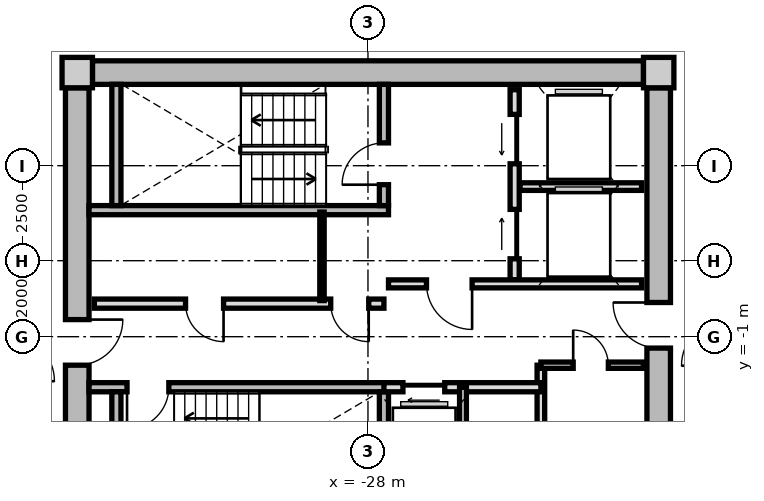
"""IFC4 building model, lengths in metres.
Left out: names, types, materials, properties, quantities, classifications, styles, units other than length and angle.
Written with IfcOpenShell. Run it as: python <this file> out.ifc"""

import sys

from ifc_helpers import new_model, si_unit, direction, frame, frame_2d, origin, origin_2d, place, context, subcontext, project, spatial, rectangle, extrude, source, transform, mapped, element, fill, save


model = new_model("IFC4")
c1 = context("Model", 3, precision=1e-05, world=origin(), true_north=direction((0.0, 1.0)))
c2 = subcontext(c1, "Body", "Model", "MODEL_VIEW")
j1 = project(units=[si_unit("LENGTHUNIT", "METRE"), si_unit("PLANEANGLEUNIT", "RADIAN")], contexts=[c1])
p1 = place(None, origin())
s1 = spatial("IfcSite", under=j1, at=p1, CompositionType="ELEMENT")
p2 = place(p1, origin())
s2 = spatial("IfcBuilding", under=s1, at=p2, CompositionType="ELEMENT")
p3 = place(p2, frame((0.0, 0.0, 149.55)))
s3 = spatial("IfcBuildingStorey", under=s2, at=p3, CompositionType="ELEMENT", Elevation=149.55)
m1 = source(origin(), c2, "Body", "SweptSolid", [
    extrude(rectangle(XDim=0.8, YDim=0.8, at=origin_2d()), origin(), (0.0, 0.0, 1.0), 3.05),
])
for number, where, z_axis, x_axis in (
    (1, (-20.35, 5.95, 0.0), (0.0, 0.0, 1.0), (1.0, 0.0, 0.0)),
    (2, (-35.65, 5.95, 0.0), (0.0, 0.0, 1.0), (1.0, 0.0, 0.0)),
):
    element("IfcColumn", number, at=place(p3, frame(where, z_axis=z_axis, x_axis=x_axis)), inside=s3, PredefinedType="COLUMN", context=c2, shape_type="MappedRepresentation", body=[
        mapped(m1, transform((0.0, 0.0, 0.0), x_axis=(1.0, 0.0, 0.0), y_axis=(0.0, 1.0, 0.0), z_axis=(0.0, 0.0, 1.0), scale=1.0)),
    ])
m2 = source(origin(), c2, "Body", "SweptSolid", [
    extrude(rectangle(XDim=14.5, YDim=0.62, at=frame_2d((7.25, 0.0))), origin(), (0.0, 0.0, 1.0), 2.81),
])
p4 = place(p3, frame((-35.25, 5.95, 0.0), z_axis=(0.0, 0.0, 1.0), x_axis=(1.0, 0.0, 0.0)))
e3 = element("IfcWall", 3, at=p4, inside=s3, PredefinedType="SHEAR", context=c2, shape_type="MappedRepresentation", body=[
    mapped(m2, transform((0.0, 0.0, 0.0), x_axis=(1.0, 0.0, 0.0), y_axis=(0.0, 1.0, 0.0), z_axis=(0.0, 0.0, 1.0), scale=1.0)),
])
m3 = source(origin(), c2, "Body", "SweptSolid", [
    extrude(rectangle(XDim=11.1, YDim=0.62, at=frame_2d((5.55, 0.0))), origin(), (0.0, 0.0, 1.0), 2.81),
])
p5 = place(p3, frame((-35.65, -5.55, 0.0), z_axis=(0.0, 0.0, 1.0), x_axis=(0.0, 1.0, 0.0)))
e4 = element("IfcWall", 4, at=p5, inside=s3, PredefinedType="SHEAR", context=c2, shape_type="MappedRepresentation", body=[
    mapped(m3, transform((0.0, 0.0, 0.0), x_axis=(1.0, 0.0, 0.0), y_axis=(0.0, 1.0, 0.0), z_axis=(0.0, 0.0, 1.0), scale=1.0)),
])
p6 = place(p5, frame((3.8, 0.0, 0.0)))
e5 = element("IfcOpeningElement", 5, at=p6, cuts=e4, PredefinedType="OPENING", context=c2, shape_type="SweptSolid", body=[
    extrude(rectangle(XDim=1.2, YDim=2.15, at=frame_2d((0.6, 1.075))), frame((0.0, 0.32, 0.0), z_axis=(0.0, -1.0, 0.0), x_axis=(1.0, 0.0, 0.0)), (0.0, 0.0, 1.0), 0.64),
])
p7 = place(p3, frame((-20.35, 5.55, 0.0), z_axis=(0.0, 0.0, 1.0), x_axis=(0.0, -1.0, 0.0)))
e6 = element("IfcWall", 6, at=p7, inside=s3, PredefinedType="SHEAR", context=c2, shape_type="MappedRepresentation", body=[
    mapped(m3, transform((0.0, 0.0, 0.0), x_axis=(1.0, 0.0, 0.0), y_axis=(0.0, 1.0, 0.0), z_axis=(0.0, 0.0, 1.0), scale=1.0)),
])
p8 = place(p7, frame((5.65, 0.0, 0.0)))
e7 = element("IfcOpeningElement", 7, at=p8, cuts=e6, PredefinedType="OPENING", context=c2, shape_type="SweptSolid", body=[
    extrude(rectangle(XDim=1.2, YDim=2.15, at=frame_2d((0.6, 1.075))), frame((0.0, 0.32, 0.0), z_axis=(0.0, -1.0, 0.0), x_axis=(1.0, 0.0, 0.0)), (0.0, 0.0, 1.0), 0.64),
])
p9 = place(p7, frame((9.3, 0.0, 0.0)))
e8 = element("IfcOpeningElement", 8, at=p9, cuts=e6, PredefinedType="OPENING", context=c2, shape_type="SweptSolid", body=[
    extrude(rectangle(XDim=1.0, YDim=2.1, at=frame_2d((0.5, 1.05))), frame((0.0, 0.32, 0.0), z_axis=(0.0, -1.0, 0.0), x_axis=(1.0, 0.0, 0.0)), (0.0, 0.0, 1.0), 0.64),
])
m4 = source(origin(), c2, "Body", "SweptSolid", [
    extrude(rectangle(XDim=7.88, YDim=0.24, at=frame_2d((3.94, 0.0))), origin(), (0.0, 0.0, 1.0), 2.81),
])
p10 = place(p3, frame((-35.34, 2.33, 0.0), z_axis=(0.0, 0.0, 1.0), x_axis=(1.0, 0.0, 0.0)))
e9 = element("IfcWall", 9, at=p10, inside=s3, PredefinedType="PARTITIONING", context=c2, shape_type="MappedRepresentation", body=[
    mapped(m4, transform((0.0, 0.0, 0.0), x_axis=(1.0, 0.0, 0.0), y_axis=(0.0, 1.0, 0.0), z_axis=(0.0, 0.0, 1.0), scale=1.0)),
])
m5 = source(origin(), c2, "Body", "SweptSolid", [
    extrude(rectangle(XDim=3.19, YDim=0.24, at=frame_2d((1.595, 0.0))), origin(), (0.0, 0.0, 1.0), 2.81),
])
p11 = place(p3, frame((-34.62, 2.45, 0.0), z_axis=(0.0, 0.0, 1.0), x_axis=(0.0, 1.0, 0.0)))
e10 = element("IfcWall", 10, at=p11, inside=s3, PredefinedType="PARTITIONING", context=c2, shape_type="MappedRepresentation", body=[
    mapped(m5, transform((0.0, 0.0, 0.0), x_axis=(1.0, 0.0, 0.0), y_axis=(0.0, 1.0, 0.0), z_axis=(0.0, 0.0, 1.0), scale=1.0)),
])
p12 = place(p3, frame((-27.58, 2.45, 0.0), z_axis=(0.0, 0.0, 1.0), x_axis=(0.0, 1.0, 0.0)))
e11 = element("IfcWall", 11, at=p12, inside=s3, PredefinedType="PARTITIONING", context=c2, shape_type="MappedRepresentation", body=[
    mapped(m5, transform((0.0, 0.0, 0.0), x_axis=(1.0, 0.0, 0.0), y_axis=(0.0, 1.0, 0.0), z_axis=(0.0, 0.0, 1.0), scale=1.0)),
])
p13 = place(p12, frame((0.55, 0.0, 0.0)))
e12 = element("IfcOpeningElement", 12, at=p13, cuts=e11, PredefinedType="OPENING", context=c2, shape_type="SweptSolid", body=[
    extrude(rectangle(XDim=1.1, YDim=2.15, at=frame_2d((0.55, 1.075))), frame((0.0, 0.13, 0.0), z_axis=(0.0, -1.0, 0.0), x_axis=(1.0, 0.0, 0.0)), (0.0, 0.0, 1.0), 0.26),
])
p14 = place(p3, frame((-35.34, -2.33, 0.0), z_axis=(0.0, 0.0, 1.0), x_axis=(1.0, 0.0, 0.0)))
e13 = element("IfcWall", 13, at=p14, inside=s3, PredefinedType="PARTITIONING", context=c2, shape_type="MappedRepresentation", body=[
    mapped(m4, transform((0.0, 0.0, 0.0), x_axis=(1.0, 0.0, 0.0), y_axis=(0.0, 1.0, 0.0), z_axis=(0.0, 0.0, 1.0), scale=1.0)),
])
p15 = place(p14, frame((1.0, 0.0, 0.0)))
e14 = element("IfcOpeningElement", 14, at=p15, cuts=e13, PredefinedType="OPENING", context=c2, shape_type="SweptSolid", body=[
    extrude(rectangle(XDim=1.1, YDim=2.15, at=frame_2d((0.55, 1.075))), frame((0.0, 0.13, 0.0), z_axis=(0.0, -1.0, 0.0), x_axis=(1.0, 0.0, 0.0)), (0.0, 0.0, 1.0), 0.26),
])
for number, where, z_axis, x_axis in (
    (15, (-34.62, -5.64, 0.0), (0.0, 0.0, 1.0), (0.0, 1.0, 0.0)),
    (16, (-27.58, -5.64, 0.0), (0.0, 0.0, 1.0), (0.0, 1.0, 0.0)),
):
    element("IfcWall", number, at=place(p3, frame(where, z_axis=z_axis, x_axis=x_axis)), inside=s3, PredefinedType="PARTITIONING", context=c2, shape_type="MappedRepresentation", body=[
        mapped(m5, transform((0.0, 0.0, 0.0), x_axis=(1.0, 0.0, 0.0), y_axis=(0.0, 1.0, 0.0), z_axis=(0.0, 0.0, 1.0), scale=1.0)),
    ])
m6 = source(origin(), c2, "Body", "SweptSolid", [
    extrude(rectangle(XDim=5.0, YDim=0.24, at=frame_2d((2.5, 0.0))), origin(), (0.0, 0.0, 1.0), 2.795),
])
p16 = place(p3, frame((-24.14, 0.5, 0.0), z_axis=(0.0, 0.0, 1.0), x_axis=(0.0, 1.0, 0.0)))
e17 = element("IfcWall", 17, at=p16, inside=s3, PredefinedType="PARTITIONING", context=c2, shape_type="MappedRepresentation", body=[
    mapped(m6, transform((0.0, 0.0, 0.0), x_axis=(1.0, 0.0, 0.0), y_axis=(0.0, 1.0, 0.0), z_axis=(0.0, 0.0, 1.0), scale=1.0)),
])
p17 = place(p16, frame((3.05, 0.0, 0.0)))
e18 = element("IfcOpeningElement", 18, at=p17, cuts=e17, PredefinedType="OPENING", context=c2, shape_type="SweptSolid", body=[
    extrude(rectangle(XDim=1.3, YDim=2.2, at=frame_2d((0.65, 1.1))), frame((0.0, 0.13, 0.0), z_axis=(0.0, -1.0, 0.0), x_axis=(1.0, 0.0, 0.0)), (0.0, 0.0, 1.0), 0.26),
])
p18 = place(p16, frame((0.55, 0.0, 0.0)))
e19 = element("IfcOpeningElement", 19, at=p18, cuts=e17, PredefinedType="OPENING", context=c2, shape_type="SweptSolid", body=[
    extrude(rectangle(XDim=1.3, YDim=2.2, at=frame_2d((0.65, 1.1))), frame((0.0, 0.13, 0.0), z_axis=(0.0, -1.0, 0.0), x_axis=(1.0, 0.0, 0.0)), (0.0, 0.0, 1.0), 0.26),
])
m7 = source(origin(), c2, "Body", "SweptSolid", [
    extrude(rectangle(XDim=3.2, YDim=0.2, at=frame_2d((1.6, 0.0))), origin(), (0.0, 0.0, 1.0), 2.795),
])
p19 = place(p3, frame((-24.0, 2.95, 0.0), z_axis=(0.0, 0.0, 1.0), x_axis=(1.0, 0.0, 0.0)))
e20 = element("IfcWall", 20, at=p19, inside=s3, PredefinedType="PARTITIONING", context=c2, shape_type="MappedRepresentation", body=[
    mapped(m7, transform((0.0, 0.0, 0.0), x_axis=(1.0, 0.0, 0.0), y_axis=(0.0, 1.0, 0.0), z_axis=(0.0, 0.0, 1.0), scale=1.0)),
])
m8 = source(origin(), c2, "Body", "SweptSolid", [
    extrude(rectangle(XDim=6.66, YDim=0.21, at=frame_2d((3.33, 0.0))), origin(), (0.0, 0.0, 1.0), 2.795),
])
p20 = place(p3, frame((-27.46, 0.39, 0.0), z_axis=(0.0, 0.0, 1.0), x_axis=(1.0, 0.0, 0.0)))
e21 = element("IfcWall", 21, at=p20, inside=s3, PredefinedType="PARTITIONING", context=c2, shape_type="MappedRepresentation", body=[
    mapped(m8, transform((0.0, 0.0, 0.0), x_axis=(1.0, 0.0, 0.0), y_axis=(0.0, 1.0, 0.0), z_axis=(0.0, 0.0, 1.0), scale=1.0)),
])
p21 = place(p20, frame((1.0, 0.0, 0.0)))
e22 = element("IfcOpeningElement", 22, at=p21, cuts=e21, PredefinedType="OPENING", context=c2, shape_type="SweptSolid", body=[
    extrude(rectangle(XDim=1.2, YDim=2.15, at=frame_2d((0.6, 1.075))), frame((0.0, 0.115, 0.0), z_axis=(0.0, -1.0, 0.0), x_axis=(1.0, 0.0, 0.0)), (0.0, 0.0, 1.0), 0.23),
])
m9 = source(origin(), c2, "Body", "SweptSolid", [
    extrude(rectangle(XDim=7.62, YDim=0.24, at=frame_2d((3.81, 0.0))), origin(), (0.0, 0.0, 1.0), 2.795),
])
p22 = place(p3, frame((-35.2, -0.13, 0.0), z_axis=(0.0, 0.0, 1.0), x_axis=(1.0, 0.0, 0.0)))
e23 = element("IfcWall", 23, at=p22, inside=s3, PredefinedType="PARTITIONING", context=c2, shape_type="MappedRepresentation", body=[
    mapped(m9, transform((0.0, 0.0, 0.0), x_axis=(1.0, 0.0, 0.0), y_axis=(0.0, 1.0, 0.0), z_axis=(0.0, 0.0, 1.0), scale=1.0)),
])
p23 = place(p22, frame((6.22, 0.0, 0.0)))
e24 = element("IfcOpeningElement", 24, at=p23, cuts=e23, PredefinedType="OPENING", context=c2, shape_type="SweptSolid", body=[
    extrude(rectangle(XDim=1.0, YDim=2.1, at=frame_2d((0.5, 1.05))), frame((0.0, 0.13, 0.0), z_axis=(0.0, -1.0, 0.0), x_axis=(1.0, 0.0, 0.0)), (0.0, 0.0, 1.0), 0.26),
])
p24 = place(p22, frame((2.4, 0.0, 0.0)))
e25 = element("IfcOpeningElement", 25, at=p24, cuts=e23, PredefinedType="OPENING", context=c2, shape_type="SweptSolid", body=[
    extrude(rectangle(XDim=1.0, YDim=2.1, at=frame_2d((0.5, 1.05))), frame((0.0, 0.13, 0.0), z_axis=(0.0, -1.0, 0.0), x_axis=(1.0, 0.0, 0.0)), (0.0, 0.0, 1.0), 0.26),
])
m10 = source(origin(), c2, "Body", "SweptSolid", [
    extrude(rectangle(XDim=2.33, YDim=0.115, at=frame_2d((1.165, 0.0))), origin(), (0.0, 0.0, 1.0), 2.795),
])
p25 = place(p3, frame((-29.21, -0.05, 0.0), z_axis=(0.0, 0.0, 1.0), x_axis=(0.0, 1.0, 0.0)))
e26 = element("IfcWall", 26, at=p25, inside=s3, PredefinedType="PARTITIONING", context=c2, shape_type="MappedRepresentation", body=[
    mapped(m10, transform((0.0, 0.0, 0.0), x_axis=(1.0, 0.0, 0.0), y_axis=(0.0, 1.0, 0.0), z_axis=(0.0, 0.0, 1.0), scale=1.0)),
])
m11 = source(origin(), c2, "Body", "SweptSolid", [
    extrude(rectangle(XDim=3.8, YDim=0.2, at=frame_2d((1.9, 0.0))), origin(), (0.0, 0.0, 1.0), 2.795),
])
p26 = place(p3, frame((-23.45, -5.55, 0.0), z_axis=(0.0, 0.0, 1.0), x_axis=(0.0, 1.0, 0.0)))
e27 = element("IfcWall", 27, at=p26, inside=s3, PredefinedType="PARTITIONING", context=c2, shape_type="MappedRepresentation", body=[
    mapped(m11, transform((0.0, 0.0, 0.0), x_axis=(1.0, 0.0, 0.0), y_axis=(0.0, 1.0, 0.0), z_axis=(0.0, 0.0, 1.0), scale=1.0)),
])
m12 = source(origin(), c2, "Body", "SweptSolid", [
    extrude(rectangle(XDim=4.13, YDim=0.24, at=frame_2d((2.065, 0.0))), origin(), (0.0, 0.0, 1.0), 2.795),
])
p27 = place(p3, frame((-27.58, -2.33, 0.0), z_axis=(0.0, 0.0, 1.0), x_axis=(1.0, 0.0, 0.0)))
e28 = element("IfcWall", 28, at=p27, inside=s3, PredefinedType="PARTITIONING", context=c2, shape_type="MappedRepresentation", body=[
    mapped(m12, transform((0.0, 0.0, 0.0), x_axis=(1.0, 0.0, 0.0), y_axis=(0.0, 1.0, 0.0), z_axis=(0.0, 0.0, 1.0), scale=1.0)),
])
p28 = place(p27, frame((0.5, 0.0, 0.0)))
e29 = element("IfcOpeningElement", 29, at=p28, cuts=e28, PredefinedType="OPENING", context=c2, shape_type="SweptSolid", body=[
    extrude(rectangle(XDim=1.1, YDim=2.2, at=frame_2d((0.55, 1.1))), frame((0.0, 0.13, 0.0), z_axis=(0.0, -1.0, 0.0), x_axis=(1.0, 0.0, 0.0)), (0.0, 0.0, 1.0), 0.26),
])
m13 = source(origin(), c2, "Body", "SweptSolid", [
    extrude(rectangle(XDim=3.22, YDim=0.18, at=frame_2d((1.61, 0.0))), origin(), (0.0, 0.0, 1.0), 2.795),
])
p29 = place(p3, frame((-25.5, -5.55, 0.0), z_axis=(0.0, 0.0, 1.0), x_axis=(0.0, 1.0, 0.0)))
e30 = element("IfcWall", 30, at=p29, inside=s3, PredefinedType="PARTITIONING", context=c2, shape_type="MappedRepresentation", body=[
    mapped(m13, transform((0.0, 0.0, 0.0), x_axis=(1.0, 0.0, 0.0), y_axis=(0.0, 1.0, 0.0), z_axis=(0.0, 0.0, 1.0), scale=1.0)),
])
m14 = source(origin(), c2, "Body", "SweptSolid", [
    extrude(rectangle(XDim=2.7, YDim=0.165, at=frame_2d((1.35, 0.0))), origin(), (0.0, 0.0, 1.0), 2.795),
])
p30 = place(p3, frame((-23.45, -1.75, 0.0), z_axis=(0.0, 0.0, 1.0), x_axis=(1.0, 0.0, 0.0)))
e31 = element("IfcWall", 31, at=p30, inside=s3, PredefinedType="PARTITIONING", context=c2, shape_type="MappedRepresentation", body=[
    mapped(m14, transform((0.0, 0.0, 0.0), x_axis=(1.0, 0.0, 0.0), y_axis=(0.0, 1.0, 0.0), z_axis=(0.0, 0.0, 1.0), scale=1.0)),
])
p31 = place(p30, frame((0.85, 0.0, 0.0)))
e32 = element("IfcOpeningElement", 32, at=p31, cuts=e31, PredefinedType="OPENING", context=c2, shape_type="SweptSolid", body=[
    extrude(rectangle(XDim=0.925, YDim=2.1, at=frame_2d((0.462, 1.05))), frame((0.0, 0.093, 0.0), z_axis=(0.0, -1.0, 0.0), x_axis=(1.0, 0.0, 0.0)), (0.0, 0.0, 1.0), 0.185),
])
m15 = source(origin(), c2, "Body", "SweptSolid", [
    extrude(rectangle(XDim=1.1, YDim=2.15, at=frame_2d((0.55, 1.075))), frame((0.0, 0.025, 0.0), z_axis=(0.0, -1.0, 0.0), x_axis=(1.0, 0.0, 0.0)), (0.0, 0.0, 1.0), 0.05),
])
p32 = place(p13, origin())
e33 = element("IfcDoor", 33, at=p32, inside=s3, OperationType="SINGLE_SWING_LEFT", PredefinedType="DOOR", context=c2, shape_type="MappedRepresentation", body=[
    mapped(m15, transform((0.0, 0.0, 0.0), x_axis=(1.0, 0.0, 0.0), y_axis=(0.0, 1.0, 0.0), z_axis=(0.0, 0.0, 1.0), scale=1.0)),
])
fill(e12, e33)
p33 = place(p15, frame((1.1, 0.0, 0.0), z_axis=(0.0, 0.0, 1.0), x_axis=(-1.0, 0.0, 0.0)))
e34 = element("IfcDoor", 34, at=p33, inside=s3, OperationType="SINGLE_SWING_RIGHT", PredefinedType="DOOR", context=c2, shape_type="MappedRepresentation", body=[
    mapped(m15, transform((0.0, 0.0, 0.0), x_axis=(1.0, 0.0, 0.0), y_axis=(0.0, 1.0, 0.0), z_axis=(0.0, 0.0, 1.0), scale=1.0)),
])
fill(e14, e34)
m16 = source(origin(), c2, "Body", "SweptSolid", [
    extrude(rectangle(XDim=1.3, YDim=2.2, at=frame_2d((0.65, 1.1))), frame((0.0, 0.025, 0.0), z_axis=(0.0, -1.0, 0.0), x_axis=(1.0, 0.0, 0.0)), (0.0, 0.0, 1.0), 0.05),
])
p34 = place(p17, origin())
e35 = element("IfcDoor", 35, at=p34, inside=s3, OperationType="SLIDING_TO_LEFT", PredefinedType="DOOR", context=c2, shape_type="MappedRepresentation", body=[
    mapped(m16, transform((0.0, 0.0, 0.0), x_axis=(1.0, 0.0, 0.0), y_axis=(0.0, 1.0, 0.0), z_axis=(0.0, 0.0, 1.0), scale=1.0)),
])
fill(e18, e35)
p35 = place(p18, origin())
e36 = element("IfcDoor", 36, at=p35, inside=s3, OperationType="SLIDING_TO_RIGHT", PredefinedType="DOOR", context=c2, shape_type="MappedRepresentation", body=[
    mapped(m16, transform((0.0, 0.0, 0.0), x_axis=(1.0, 0.0, 0.0), y_axis=(0.0, 1.0, 0.0), z_axis=(0.0, 0.0, 1.0), scale=1.0)),
])
fill(e19, e36)
m17 = source(origin(), c2, "Body", "SweptSolid", [
    extrude(rectangle(XDim=1.2, YDim=2.15, at=frame_2d((0.6, 1.075))), frame((0.0, 0.025, 0.0), z_axis=(0.0, -1.0, 0.0), x_axis=(1.0, 0.0, 0.0)), (0.0, 0.0, 1.0), 0.05),
])
p36 = place(p21, frame((1.2, 0.0, 0.0), z_axis=(0.0, 0.0, 1.0), x_axis=(-1.0, 0.0, 0.0)))
e37 = element("IfcDoor", 37, at=p36, inside=s3, OperationType="SINGLE_SWING_LEFT", PredefinedType="DOOR", context=c2, shape_type="MappedRepresentation", body=[
    mapped(m17, transform((0.0, 0.0, 0.0), x_axis=(1.0, 0.0, 0.0), y_axis=(0.0, 1.0, 0.0), z_axis=(0.0, 0.0, 1.0), scale=1.0)),
])
fill(e22, e37)
p37 = place(p6, frame((1.2, 0.0, 0.0), z_axis=(0.0, 0.0, 1.0), x_axis=(-1.0, 0.0, 0.0)))
e38 = element("IfcDoor", 38, at=p37, inside=s3, OperationType="SINGLE_SWING_LEFT", PredefinedType="DOOR", context=c2, shape_type="MappedRepresentation", body=[
    mapped(m17, transform((0.0, 0.0, 0.0), x_axis=(1.0, 0.0, 0.0), y_axis=(0.0, 1.0, 0.0), z_axis=(0.0, 0.0, 1.0), scale=1.0)),
])
fill(e5, e38)
p38 = place(p8, frame((1.2, 0.0, 0.0), z_axis=(0.0, 0.0, 1.0), x_axis=(-1.0, 0.0, 0.0)))
e39 = element("IfcDoor", 39, at=p38, inside=s3, OperationType="SINGLE_SWING_RIGHT", PredefinedType="DOOR", context=c2, shape_type="MappedRepresentation", body=[
    mapped(m17, transform((0.0, 0.0, 0.0), x_axis=(1.0, 0.0, 0.0), y_axis=(0.0, 1.0, 0.0), z_axis=(0.0, 0.0, 1.0), scale=1.0)),
])
fill(e7, e39)
m18 = source(origin(), c2, "Body", "SweptSolid", [
    extrude(rectangle(XDim=1.0, YDim=2.1, at=frame_2d((0.5, 1.05))), frame((0.0, 0.025, 0.0), z_axis=(0.0, -1.0, 0.0), x_axis=(1.0, 0.0, 0.0)), (0.0, 0.0, 1.0), 0.05),
])
p39 = place(p23, frame((1.0, 0.0, 0.0), z_axis=(0.0, 0.0, 1.0), x_axis=(-1.0, 0.0, 0.0)))
e40 = element("IfcDoor", 40, at=p39, inside=s3, OperationType="SINGLE_SWING_LEFT", PredefinedType="DOOR", context=c2, shape_type="MappedRepresentation", body=[
    mapped(m18, transform((0.0, 0.0, 0.0), x_axis=(1.0, 0.0, 0.0), y_axis=(0.0, 1.0, 0.0), z_axis=(0.0, 0.0, 1.0), scale=1.0)),
])
fill(e24, e40)
p40 = place(p24, frame((1.0, 0.0, 0.0), z_axis=(0.0, 0.0, 1.0), x_axis=(-1.0, 0.0, 0.0)))
e41 = element("IfcDoor", 41, at=p40, inside=s3, OperationType="SINGLE_SWING_LEFT", PredefinedType="DOOR", context=c2, shape_type="MappedRepresentation", body=[
    mapped(m18, transform((0.0, 0.0, 0.0), x_axis=(1.0, 0.0, 0.0), y_axis=(0.0, 1.0, 0.0), z_axis=(0.0, 0.0, 1.0), scale=1.0)),
])
fill(e25, e41)
m19 = source(origin(), c2, "Body", "SweptSolid", [
    extrude(rectangle(XDim=1.1, YDim=2.2, at=frame_2d((0.55, 1.1))), frame((0.0, 0.025, 0.0), z_axis=(0.0, -1.0, 0.0), x_axis=(1.0, 0.0, 0.0)), (0.0, 0.0, 1.0), 0.05),
])
p41 = place(p28, frame((1.1, 0.0, 0.0), z_axis=(0.0, 0.0, 1.0), x_axis=(-1.0, 0.0, 0.0)))
e42 = element("IfcDoor", 42, at=p41, inside=s3, OperationType="SLIDING_TO_LEFT", PredefinedType="DOOR", context=c2, shape_type="MappedRepresentation", body=[
    mapped(m19, transform((0.0, 0.0, 0.0), x_axis=(1.0, 0.0, 0.0), y_axis=(0.0, 1.0, 0.0), z_axis=(0.0, 0.0, 1.0), scale=1.0)),
])
fill(e29, e42)
m20 = source(origin(), c2, "Body", "SweptSolid", [
    extrude(rectangle(XDim=0.925, YDim=2.1, at=frame_2d((0.462, 1.05))), frame((0.0, 0.025, 0.0), z_axis=(0.0, -1.0, 0.0), x_axis=(1.0, 0.0, 0.0)), (0.0, 0.0, 1.0), 0.05),
])
p42 = place(p31, origin())
e43 = element("IfcDoor", 43, at=p42, inside=s3, OperationType="SINGLE_SWING_LEFT", PredefinedType="DOOR", context=c2, shape_type="MappedRepresentation", body=[
    mapped(m20, transform((0.0, 0.0, 0.0), x_axis=(1.0, 0.0, 0.0), y_axis=(0.0, 1.0, 0.0), z_axis=(0.0, 0.0, 1.0), scale=1.0)),
])
fill(e32, e43)
save(model, sys.argv[1])
